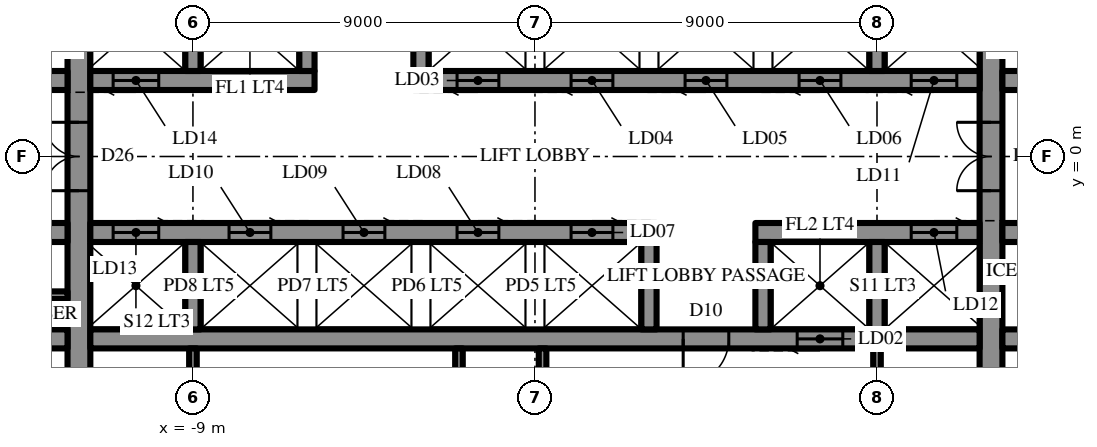
"""IFC4 building model, lengths in metres.
Left out: names, types, materials, properties, quantities, classifications, styles, units other than length and angle.
Written with IfcOpenShell. Run it as: python <this file> out.ifc"""

import sys

from ifc_helpers import new_model, si_unit, direction, frame, frame_2d, origin, place, context, subcontext, project, spatial, rectangle, extrude, element, fill, save


model = new_model("IFC4")
c1 = context("Model", 3, precision=1e-05, world=origin(), true_north=direction((0.0, 1.0)))
c2 = subcontext(c1, "Body", "Model", "MODEL_VIEW")
j1 = project(units=[si_unit("LENGTHUNIT", "METRE"), si_unit("PLANEANGLEUNIT", "RADIAN")], contexts=[c1])
p1 = place(None, origin())
s1 = spatial("IfcSite", under=j1, at=p1, CompositionType="ELEMENT")
p2 = place(p1, origin())
s2 = spatial("IfcBuilding", under=s1, at=p2, CompositionType="ELEMENT")
p3 = place(p2, frame((0.0, 0.0, 306.5)))
s3 = spatial("IfcBuildingStorey", under=s2, at=p3, CompositionType="ELEMENT", Elevation=306.5)
p4 = place(p3, frame((12.0, -10.7, 0.0), z_axis=(0.0, 0.0, 1.0), x_axis=(0.0, 1.0, 0.0)))
e1 = element("IfcWall", 1, at=p4, inside=s3, PredefinedType="SHEAR", context=c2, shape_type="SweptSolid", body=[
    extrude(rectangle(XDim=21.4, YDim=0.6, at=frame_2d((10.7, 0.0))), origin(), (0.0, 0.0, 1.0), 5.0),
])
p5 = place(p4, frame((9.8, 0.0, 0.0)))
e2 = element("IfcOpeningElement", 2, at=p5, cuts=e1, PredefinedType="OPENING", context=c2, shape_type="SweptSolid", body=[
    extrude(rectangle(XDim=1.8, YDim=2.4, at=frame_2d((0.9, 1.2))), frame((0.0, 0.31, 0.0), z_axis=(0.0, -1.0, 0.0), x_axis=(1.0, 0.0, 0.0)), (0.0, 0.0, 1.0), 0.62),
])
p6 = place(p3, frame((-12.0, -10.7, 0.0), z_axis=(0.0, 0.0, 1.0), x_axis=(0.0, 1.0, 0.0)))
e3 = element("IfcWall", 3, at=p6, inside=s3, PredefinedType="SHEAR", context=c2, shape_type="SweptSolid", body=[
    extrude(rectangle(XDim=21.4, YDim=0.6, at=frame_2d((10.7, 0.0))), origin(), (0.0, 0.0, 1.0), 5.0),
])
p7 = place(p6, frame((9.8, 0.0, 0.0)))
e4 = element("IfcOpeningElement", 4, at=p7, cuts=e3, PredefinedType="OPENING", context=c2, shape_type="SweptSolid", body=[
    extrude(rectangle(XDim=1.8, YDim=2.4, at=frame_2d((0.9, 1.2))), frame((0.0, 0.31, 0.0), z_axis=(0.0, -1.0, 0.0), x_axis=(1.0, 0.0, 0.0)), (0.0, 0.0, 1.0), 0.62),
])
p8 = place(p3, frame((-14.5, 2.0, 0.0), z_axis=(0.0, 0.0, 1.0), x_axis=(1.0, 0.0, 0.0)))
e5 = element("IfcWall", 5, at=p8, inside=s3, PredefinedType="SHEAR", context=c2, shape_type="SweptSolid", body=[
    extrude(rectangle(XDim=2.2, YDim=0.5, at=frame_2d((1.1, 0.0))), origin(), (0.0, 0.0, 1.0), 5.0),
])
p9 = place(p8, frame((0.5, 0.0, 0.0)))
e6 = element("IfcOpeningElement", 6, at=p9, cuts=e5, PredefinedType="OPENING", context=c2, shape_type="SweptSolid", body=[
    extrude(rectangle(XDim=0.9, YDim=2.2, at=frame_2d((0.45, 1.1))), frame((0.0, 0.26, 0.0), z_axis=(0.0, -1.0, 0.0), x_axis=(1.0, 0.0, 0.0)), (0.0, 0.0, 1.0), 0.52),
])
p10 = place(p3, frame((-11.7, 2.0, 0.0), z_axis=(0.0, 0.0, 1.0), x_axis=(1.0, 0.0, 0.0)))
e7 = element("IfcWall", 7, at=p10, inside=s3, PredefinedType="SHEAR", context=c2, shape_type="SweptSolid", body=[
    extrude(rectangle(XDim=5.9, YDim=0.5, at=frame_2d((2.95, 0.0))), origin(), (0.0, 0.0, 1.0), 5.0),
])
p11 = place(p10, frame((0.6, 0.0, 0.0)))
e8 = element("IfcOpeningElement", 8, at=p11, cuts=e7, PredefinedType="OPENING", context=c2, shape_type="SweptSolid", body=[
    extrude(rectangle(XDim=1.2, YDim=2.2, at=frame_2d((0.6, 1.1))), frame((0.0, 0.26, 0.0), z_axis=(0.0, -1.0, 0.0), x_axis=(1.0, 0.0, 0.0)), (0.0, 0.0, 1.0), 0.52),
])
p12 = place(p3, frame((-3.2, 2.0, 0.0), z_axis=(0.0, 0.0, 1.0), x_axis=(1.0, 0.0, 0.0)))
e9 = element("IfcWall", 9, at=p12, inside=s3, PredefinedType="SHEAR", context=c2, shape_type="SweptSolid", body=[
    extrude(rectangle(XDim=14.9, YDim=0.5, at=frame_2d((7.45, 0.0))), origin(), (0.0, 0.0, 1.0), 5.0),
])
p13 = place(p12, frame((1.15, 0.0, 0.0)))
e10 = element("IfcOpeningElement", 10, at=p13, cuts=e9, PredefinedType="OPENING", context=c2, shape_type="SweptSolid", body=[
    extrude(rectangle(XDim=1.1, YDim=2.2, at=frame_2d((0.55, 1.1))), frame((0.0, 0.26, 0.0), z_axis=(0.0, -1.0, 0.0), x_axis=(1.0, 0.0, 0.0)), (0.0, 0.0, 1.0), 0.52),
])
p14 = place(p12, frame((4.15, 0.0, 0.0)))
e11 = element("IfcOpeningElement", 11, at=p14, cuts=e9, PredefinedType="OPENING", context=c2, shape_type="SweptSolid", body=[
    extrude(rectangle(XDim=1.1, YDim=2.2, at=frame_2d((0.55, 1.1))), frame((0.0, 0.26, 0.0), z_axis=(0.0, -1.0, 0.0), x_axis=(1.0, 0.0, 0.0)), (0.0, 0.0, 1.0), 0.52),
])
p15 = place(p12, frame((7.15, 0.0, 0.0)))
e12 = element("IfcOpeningElement", 12, at=p15, cuts=e9, PredefinedType="OPENING", context=c2, shape_type="SweptSolid", body=[
    extrude(rectangle(XDim=1.1, YDim=2.2, at=frame_2d((0.55, 1.1))), frame((0.0, 0.26, 0.0), z_axis=(0.0, -1.0, 0.0), x_axis=(1.0, 0.0, 0.0)), (0.0, 0.0, 1.0), 0.52),
])
p16 = place(p12, frame((10.15, 0.0, 0.0)))
e13 = element("IfcOpeningElement", 13, at=p16, cuts=e9, PredefinedType="OPENING", context=c2, shape_type="SweptSolid", body=[
    extrude(rectangle(XDim=1.1, YDim=2.2, at=frame_2d((0.55, 1.1))), frame((0.0, 0.26, 0.0), z_axis=(0.0, -1.0, 0.0), x_axis=(1.0, 0.0, 0.0)), (0.0, 0.0, 1.0), 0.52),
])
p17 = place(p12, frame((13.1, 0.0, 0.0)))
e14 = element("IfcOpeningElement", 14, at=p17, cuts=e9, PredefinedType="OPENING", context=c2, shape_type="SweptSolid", body=[
    extrude(rectangle(XDim=1.2, YDim=2.2, at=frame_2d((0.6, 1.1))), frame((0.0, 0.26, 0.0), z_axis=(0.0, -1.0, 0.0), x_axis=(1.0, 0.0, 0.0)), (0.0, 0.0, 1.0), 0.52),
])
p18 = place(p3, frame((12.3, 2.0, 0.0), z_axis=(0.0, 0.0, 1.0), x_axis=(1.0, 0.0, 0.0)))
e15 = element("IfcWall", 15, at=p18, inside=s3, PredefinedType="SHEAR", context=c2, shape_type="SweptSolid", body=[
    extrude(rectangle(XDim=2.2, YDim=0.5, at=frame_2d((1.1, 0.0))), origin(), (0.0, 0.0, 1.0), 5.0),
])
p19 = place(p18, frame((0.8, 0.0, 0.0)))
e16 = element("IfcOpeningElement", 16, at=p19, cuts=e15, PredefinedType="OPENING", context=c2, shape_type="SweptSolid", body=[
    extrude(rectangle(XDim=0.9, YDim=2.2, at=frame_2d((0.45, 1.1))), frame((0.0, 0.26, 0.0), z_axis=(0.0, -1.0, 0.0), x_axis=(1.0, 0.0, 0.0)), (0.0, 0.0, 1.0), 0.52),
])
for number, where, z_axis, x_axis in (
    (17, (-9.0, 2.25, 0.0), (0.0, 0.0, 1.0), (0.0, 1.0, 0.0)),
    (18, (-6.0, 2.25, 0.0), (0.0, 0.0, 1.0), (0.0, 1.0, 0.0)),
    (19, (-3.0, 2.25, 0.0), (0.0, 0.0, 1.0), (0.0, 1.0, 0.0)),
    (20, (9.0, 2.25, 0.0), (0.0, 0.0, 1.0), (0.0, 1.0, 0.0)),
):
    element("IfcWall", number, at=place(p3, frame(where, z_axis=z_axis, x_axis=x_axis)), inside=s3, PredefinedType="SHEAR", context=c2, shape_type="SweptSolid", body=[
        extrude(rectangle(XDim=2.3, YDim=0.4, at=frame_2d((1.15, 0.0))), origin(), (0.0, 0.0, 1.0), 5.0),
    ])
p20 = place(p3, frame((14.5, -2.0, 0.0), z_axis=(0.0, 0.0, 1.0), x_axis=(-1.0, 0.0, 0.0)))
e21 = element("IfcWall", 21, at=p20, inside=s3, PredefinedType="SHEAR", context=c2, shape_type="SweptSolid", body=[
    extrude(rectangle(XDim=2.2, YDim=0.5, at=frame_2d((1.1, 0.0))), origin(), (0.0, 0.0, 1.0), 5.0),
])
p21 = place(p20, frame((0.5, 0.0, 0.0)))
e22 = element("IfcOpeningElement", 22, at=p21, cuts=e21, PredefinedType="OPENING", context=c2, shape_type="SweptSolid", body=[
    extrude(rectangle(XDim=0.9, YDim=2.2, at=frame_2d((0.45, 1.1))), frame((0.0, 0.26, 0.0), z_axis=(0.0, -1.0, 0.0), x_axis=(1.0, 0.0, 0.0)), (0.0, 0.0, 1.0), 0.52),
])
p22 = place(p3, frame((11.7, -2.0, 0.0), z_axis=(0.0, 0.0, 1.0), x_axis=(-1.0, 0.0, 0.0)))
e23 = element("IfcWall", 23, at=p22, inside=s3, PredefinedType="SHEAR", context=c2, shape_type="SweptSolid", body=[
    extrude(rectangle(XDim=5.9, YDim=0.5, at=frame_2d((2.95, 0.0))), origin(), (0.0, 0.0, 1.0), 5.0),
])
p23 = place(p22, frame((0.6, 0.0, 0.0)))
e24 = element("IfcOpeningElement", 24, at=p23, cuts=e23, PredefinedType="OPENING", context=c2, shape_type="SweptSolid", body=[
    extrude(rectangle(XDim=1.2, YDim=2.2, at=frame_2d((0.6, 1.1))), frame((0.0, 0.26, 0.0), z_axis=(0.0, -1.0, 0.0), x_axis=(1.0, 0.0, 0.0)), (0.0, 0.0, 1.0), 0.52),
])
p24 = place(p3, frame((3.2, -2.0, 0.0), z_axis=(0.0, 0.0, 1.0), x_axis=(-1.0, 0.0, 0.0)))
e25 = element("IfcWall", 25, at=p24, inside=s3, PredefinedType="SHEAR", context=c2, shape_type="SweptSolid", body=[
    extrude(rectangle(XDim=14.9, YDim=0.5, at=frame_2d((7.45, 0.0))), origin(), (0.0, 0.0, 1.0), 5.0),
])
p25 = place(p24, frame((1.15, 0.0, 0.0)))
e26 = element("IfcOpeningElement", 26, at=p25, cuts=e25, PredefinedType="OPENING", context=c2, shape_type="SweptSolid", body=[
    extrude(rectangle(XDim=1.1, YDim=2.2, at=frame_2d((0.55, 1.1))), frame((0.0, 0.26, 0.0), z_axis=(0.0, -1.0, 0.0), x_axis=(1.0, 0.0, 0.0)), (0.0, 0.0, 1.0), 0.52),
])
p26 = place(p24, frame((4.15, 0.0, 0.0)))
e27 = element("IfcOpeningElement", 27, at=p26, cuts=e25, PredefinedType="OPENING", context=c2, shape_type="SweptSolid", body=[
    extrude(rectangle(XDim=1.1, YDim=2.2, at=frame_2d((0.55, 1.1))), frame((0.0, 0.26, 0.0), z_axis=(0.0, -1.0, 0.0), x_axis=(1.0, 0.0, 0.0)), (0.0, 0.0, 1.0), 0.52),
])
p27 = place(p24, frame((7.15, 0.0, 0.0)))
e28 = element("IfcOpeningElement", 28, at=p27, cuts=e25, PredefinedType="OPENING", context=c2, shape_type="SweptSolid", body=[
    extrude(rectangle(XDim=1.1, YDim=2.2, at=frame_2d((0.55, 1.1))), frame((0.0, 0.26, 0.0), z_axis=(0.0, -1.0, 0.0), x_axis=(1.0, 0.0, 0.0)), (0.0, 0.0, 1.0), 0.52),
])
p28 = place(p24, frame((10.15, 0.0, 0.0)))
e29 = element("IfcOpeningElement", 29, at=p28, cuts=e25, PredefinedType="OPENING", context=c2, shape_type="SweptSolid", body=[
    extrude(rectangle(XDim=1.1, YDim=2.2, at=frame_2d((0.55, 1.1))), frame((0.0, 0.26, 0.0), z_axis=(0.0, -1.0, 0.0), x_axis=(1.0, 0.0, 0.0)), (0.0, 0.0, 1.0), 0.52),
])
p29 = place(p24, frame((13.1, 0.0, 0.0)))
e30 = element("IfcOpeningElement", 30, at=p29, cuts=e25, PredefinedType="OPENING", context=c2, shape_type="SweptSolid", body=[
    extrude(rectangle(XDim=1.2, YDim=2.2, at=frame_2d((0.6, 1.1))), frame((0.0, 0.26, 0.0), z_axis=(0.0, -1.0, 0.0), x_axis=(1.0, 0.0, 0.0)), (0.0, 0.0, 1.0), 0.52),
])
p30 = place(p3, frame((-12.3, -2.0, 0.0), z_axis=(0.0, 0.0, 1.0), x_axis=(-1.0, 0.0, 0.0)))
e31 = element("IfcWall", 31, at=p30, inside=s3, PredefinedType="SHEAR", context=c2, shape_type="SweptSolid", body=[
    extrude(rectangle(XDim=2.2, YDim=0.5, at=frame_2d((1.1, 0.0))), origin(), (0.0, 0.0, 1.0), 5.0),
])
p31 = place(p30, frame((0.8, 0.0, 0.0)))
e32 = element("IfcOpeningElement", 32, at=p31, cuts=e31, PredefinedType="OPENING", context=c2, shape_type="SweptSolid", body=[
    extrude(rectangle(XDim=0.9, YDim=2.2, at=frame_2d((0.45, 1.1))), frame((0.0, 0.26, 0.0), z_axis=(0.0, -1.0, 0.0), x_axis=(1.0, 0.0, 0.0)), (0.0, 0.0, 1.0), 0.52),
])
p32 = place(p3, frame((14.5, -4.8, 0.0), z_axis=(0.0, 0.0, 1.0), x_axis=(-1.0, 0.0, 0.0)))
e33 = element("IfcWall", 33, at=p32, inside=s3, PredefinedType="SHEAR", context=c2, shape_type="SweptSolid", body=[
    extrude(rectangle(XDim=2.2, YDim=0.5, at=frame_2d((1.1, 0.0))), origin(), (0.0, 0.0, 1.0), 5.0),
])
p33 = place(p3, frame((11.7, -4.8, 0.0), z_axis=(0.0, 0.0, 1.0), x_axis=(-1.0, 0.0, 0.0)))
e34 = element("IfcWall", 34, at=p33, inside=s3, PredefinedType="SHEAR", context=c2, shape_type="SweptSolid", body=[
    extrude(rectangle(XDim=23.4, YDim=0.5, at=frame_2d((11.7, 0.0))), origin(), (0.0, 0.0, 1.0), 5.0),
])
p34 = place(p33, frame((6.6, 0.0, 0.0)))
e35 = element("IfcOpeningElement", 35, at=p34, cuts=e34, PredefinedType="OPENING", context=c2, shape_type="SweptSolid", body=[
    extrude(rectangle(XDim=1.2, YDim=2.2, at=frame_2d((0.6, 1.1))), frame((0.0, 0.26, 0.0), z_axis=(0.0, -1.0, 0.0), x_axis=(1.0, 0.0, 0.0)), (0.0, 0.0, 1.0), 0.52),
])
p35 = place(p33, frame((3.6, 0.0, 0.0)))
e36 = element("IfcOpeningElement", 36, at=p35, cuts=e34, PredefinedType="OPENING", context=c2, shape_type="SweptSolid", body=[
    extrude(rectangle(XDim=1.2, YDim=2.2, at=frame_2d((0.6, 1.1))), frame((0.0, 0.26, 0.0), z_axis=(0.0, -1.0, 0.0), x_axis=(1.0, 0.0, 0.0)), (0.0, 0.0, 1.0), 0.52),
])
p36 = place(p3, frame((-12.3, -4.8, 0.0), z_axis=(0.0, 0.0, 1.0), x_axis=(-1.0, 0.0, 0.0)))
e37 = element("IfcWall", 37, at=p36, inside=s3, PredefinedType="SHEAR", context=c2, shape_type="SweptSolid", body=[
    extrude(rectangle(XDim=2.2, YDim=0.5, at=frame_2d((1.1, 0.0))), origin(), (0.0, 0.0, 1.0), 5.0),
])
for number, where, z_axis, x_axis in (
    (38, (9.0, -2.25, 0.0), (0.0, 0.0, 1.0), (0.0, -1.0, 0.0)),
    (39, (6.0, -2.25, 0.0), (0.0, 0.0, 1.0), (0.0, -1.0, 0.0)),
    (40, (3.0, -2.25, 0.0), (0.0, 0.0, 1.0), (0.0, -1.0, 0.0)),
    (41, (-9.0, -2.25, 0.0), (0.0, 0.0, 1.0), (0.0, -1.0, 0.0)),
):
    element("IfcWall", number, at=place(p3, frame(where, z_axis=z_axis, x_axis=x_axis)), inside=s3, PredefinedType="SHEAR", context=c2, shape_type="SweptSolid", body=[
        extrude(rectangle(XDim=2.3, YDim=0.4, at=frame_2d((1.15, 0.0))), origin(), (0.0, 0.0, 1.0), 5.0),
    ])
p37 = place(p3, frame((0.2, -5.05, 0.0), z_axis=(0.0, 0.0, 1.0), x_axis=(0.0, -1.0, 0.0)))
e42 = element("IfcWall", 42, at=p37, inside=s3, PredefinedType="SHEAR", context=c2, shape_type="SweptSolid", body=[
    extrude(rectangle(XDim=5.65, YDim=0.2, at=frame_2d((2.825, 0.0))), origin(), (0.0, 0.0, 1.0), 5.0),
])
for number, where, z_axis, x_axis in (
    (43, (9.0, -5.05, 0.0), (0.0, 0.0, 1.0), (0.0, -1.0, 0.0)),
    (44, (-9.0, -5.05, 0.0), (0.0, 0.0, 1.0), (0.0, -1.0, 0.0)),
    (45, (-2.0, -5.05, 0.0), (0.0, 0.0, 1.0), (0.0, -1.0, 0.0)),
):
    element("IfcWall", number, at=place(p3, frame(where, z_axis=z_axis, x_axis=x_axis)), inside=s3, PredefinedType="PARTITIONING", context=c2, shape_type="SweptSolid", body=[
        extrude(rectangle(XDim=5.65, YDim=0.2, at=frame_2d((2.825, 0.0))), origin(), (0.0, 0.0, 1.0), 4.8),
    ])
p38 = place(p3, frame((-12.3, -3.65, 0.0), z_axis=(0.0, 0.0, 1.0), x_axis=(-1.0, 0.0, 0.0)))
e46 = element("IfcWall", 46, at=p38, inside=s3, PredefinedType="PARTITIONING", context=c2, shape_type="SweptSolid", body=[
    extrude(rectangle(XDim=1.0, YDim=0.2, at=frame_2d((0.5, 0.0))), origin(), (0.0, 0.0, 1.0), 4.8),
])
p39 = place(p34, origin())
e47 = element("IfcDoor", 47, at=p39, inside=s3, OperationType="SINGLE_SWING_LEFT", PredefinedType="DOOR", context=c2, shape_type="SweptSolid", body=[
    extrude(rectangle(XDim=1.2, YDim=2.2, at=frame_2d((0.6, 1.1))), frame((0.0, 0.025, 0.0), z_axis=(0.0, -1.0, 0.0), x_axis=(1.0, 0.0, 0.0)), (0.0, 0.0, 1.0), 0.05),
])
fill(e35, e47)
p40 = place(p5, origin())
e48 = element("IfcDoor", 48, at=p40, inside=s3, OperationType="DOUBLE_DOOR_SINGLE_SWING", PredefinedType="DOOR", context=c2, shape_type="SweptSolid", body=[
    extrude(rectangle(XDim=1.8, YDim=2.4, at=frame_2d((0.9, 1.2))), frame((0.0, 0.025, 0.0), z_axis=(0.0, -1.0, 0.0), x_axis=(1.0, 0.0, 0.0)), (0.0, 0.0, 1.0), 0.05),
])
fill(e2, e48)
p41 = place(p7, origin())
e49 = element("IfcDoor", 49, at=p41, inside=s3, OperationType="DOUBLE_DOOR_SINGLE_SWING", PredefinedType="DOOR", context=c2, shape_type="SweptSolid", body=[
    extrude(rectangle(XDim=1.8, YDim=2.4, at=frame_2d((0.9, 1.2))), frame((0.0, 0.025, 0.0), z_axis=(0.0, -1.0, 0.0), x_axis=(1.0, 0.0, 0.0)), (0.0, 0.0, 1.0), 0.05),
])
fill(e4, e49)
p42 = place(p11, frame((1.2, 0.0, 0.0), z_axis=(0.0, 0.0, 1.0), x_axis=(-1.0, 0.0, 0.0)))
e50 = element("IfcDoor", 50, at=p42, inside=s3, OperationType="SLIDING_TO_LEFT", PredefinedType="DOOR", context=c2, shape_type="SweptSolid", body=[
    extrude(rectangle(XDim=1.2, YDim=2.2, at=frame_2d((0.6, 1.1))), frame((0.0, 0.025, 0.0), z_axis=(0.0, -1.0, 0.0), x_axis=(1.0, 0.0, 0.0)), (0.0, 0.0, 1.0), 0.05),
])
fill(e8, e50)
p43 = place(p13, frame((1.1, 0.0, 0.0), z_axis=(0.0, 0.0, 1.0), x_axis=(-1.0, 0.0, 0.0)))
e51 = element("IfcDoor", 51, at=p43, inside=s3, OperationType="SLIDING_TO_LEFT", PredefinedType="DOOR", context=c2, shape_type="SweptSolid", body=[
    extrude(rectangle(XDim=1.1, YDim=2.2, at=frame_2d((0.55, 1.1))), frame((0.0, 0.025, 0.0), z_axis=(0.0, -1.0, 0.0), x_axis=(1.0, 0.0, 0.0)), (0.0, 0.0, 1.0), 0.05),
])
fill(e10, e51)
p44 = place(p14, frame((1.1, 0.0, 0.0), z_axis=(0.0, 0.0, 1.0), x_axis=(-1.0, 0.0, 0.0)))
e52 = element("IfcDoor", 52, at=p44, inside=s3, OperationType="SLIDING_TO_LEFT", PredefinedType="DOOR", context=c2, shape_type="SweptSolid", body=[
    extrude(rectangle(XDim=1.1, YDim=2.2, at=frame_2d((0.55, 1.1))), frame((0.0, 0.025, 0.0), z_axis=(0.0, -1.0, 0.0), x_axis=(1.0, 0.0, 0.0)), (0.0, 0.0, 1.0), 0.05),
])
fill(e11, e52)
p45 = place(p15, frame((1.1, 0.0, 0.0), z_axis=(0.0, 0.0, 1.0), x_axis=(-1.0, 0.0, 0.0)))
e53 = element("IfcDoor", 53, at=p45, inside=s3, OperationType="SLIDING_TO_LEFT", PredefinedType="DOOR", context=c2, shape_type="SweptSolid", body=[
    extrude(rectangle(XDim=1.1, YDim=2.2, at=frame_2d((0.55, 1.1))), frame((0.0, 0.025, 0.0), z_axis=(0.0, -1.0, 0.0), x_axis=(1.0, 0.0, 0.0)), (0.0, 0.0, 1.0), 0.05),
])
fill(e12, e53)
p46 = place(p16, frame((1.1, 0.0, 0.0), z_axis=(0.0, 0.0, 1.0), x_axis=(-1.0, 0.0, 0.0)))
e54 = element("IfcDoor", 54, at=p46, inside=s3, OperationType="SLIDING_TO_LEFT", PredefinedType="DOOR", context=c2, shape_type="SweptSolid", body=[
    extrude(rectangle(XDim=1.1, YDim=2.2, at=frame_2d((0.55, 1.1))), frame((0.0, 0.025, 0.0), z_axis=(0.0, -1.0, 0.0), x_axis=(1.0, 0.0, 0.0)), (0.0, 0.0, 1.0), 0.05),
])
fill(e13, e54)
p47 = place(p17, frame((1.2, 0.0, 0.0), z_axis=(0.0, 0.0, 1.0), x_axis=(-1.0, 0.0, 0.0)))
e55 = element("IfcDoor", 55, at=p47, inside=s3, OperationType="SLIDING_TO_LEFT", PredefinedType="DOOR", context=c2, shape_type="SweptSolid", body=[
    extrude(rectangle(XDim=1.2, YDim=2.2, at=frame_2d((0.6, 1.1))), frame((0.0, 0.025, 0.0), z_axis=(0.0, -1.0, 0.0), x_axis=(1.0, 0.0, 0.0)), (0.0, 0.0, 1.0), 0.05),
])
fill(e14, e55)
p48 = place(p23, frame((1.2, 0.0, 0.0), z_axis=(0.0, 0.0, 1.0), x_axis=(-1.0, 0.0, 0.0)))
e56 = element("IfcDoor", 56, at=p48, inside=s3, OperationType="SLIDING_TO_LEFT", PredefinedType="DOOR", context=c2, shape_type="SweptSolid", body=[
    extrude(rectangle(XDim=1.2, YDim=2.2, at=frame_2d((0.6, 1.1))), frame((0.0, 0.025, 0.0), z_axis=(0.0, -1.0, 0.0), x_axis=(1.0, 0.0, 0.0)), (0.0, 0.0, 1.0), 0.05),
])
fill(e24, e56)
p49 = place(p35, origin())
e57 = element("IfcDoor", 57, at=p49, inside=s3, OperationType="SLIDING_TO_LEFT", PredefinedType="DOOR", context=c2, shape_type="SweptSolid", body=[
    extrude(rectangle(XDim=1.2, YDim=2.2, at=frame_2d((0.6, 1.1))), frame((0.0, 0.025, 0.0), z_axis=(0.0, -1.0, 0.0), x_axis=(1.0, 0.0, 0.0)), (0.0, 0.0, 1.0), 0.05),
])
fill(e36, e57)
p50 = place(p25, frame((1.1, 0.0, 0.0), z_axis=(0.0, 0.0, 1.0), x_axis=(-1.0, 0.0, 0.0)))
e58 = element("IfcDoor", 58, at=p50, inside=s3, OperationType="SLIDING_TO_LEFT", PredefinedType="DOOR", context=c2, shape_type="SweptSolid", body=[
    extrude(rectangle(XDim=1.1, YDim=2.2, at=frame_2d((0.55, 1.1))), frame((0.0, 0.025, 0.0), z_axis=(0.0, -1.0, 0.0), x_axis=(1.0, 0.0, 0.0)), (0.0, 0.0, 1.0), 0.05),
])
fill(e26, e58)
p51 = place(p26, frame((1.1, 0.0, 0.0), z_axis=(0.0, 0.0, 1.0), x_axis=(-1.0, 0.0, 0.0)))
e59 = element("IfcDoor", 59, at=p51, inside=s3, OperationType="SLIDING_TO_LEFT", PredefinedType="DOOR", context=c2, shape_type="SweptSolid", body=[
    extrude(rectangle(XDim=1.1, YDim=2.2, at=frame_2d((0.55, 1.1))), frame((0.0, 0.025, 0.0), z_axis=(0.0, -1.0, 0.0), x_axis=(1.0, 0.0, 0.0)), (0.0, 0.0, 1.0), 0.05),
])
fill(e27, e59)
p52 = place(p27, frame((1.1, 0.0, 0.0), z_axis=(0.0, 0.0, 1.0), x_axis=(-1.0, 0.0, 0.0)))
e60 = element("IfcDoor", 60, at=p52, inside=s3, OperationType="SLIDING_TO_LEFT", PredefinedType="DOOR", context=c2, shape_type="SweptSolid", body=[
    extrude(rectangle(XDim=1.1, YDim=2.2, at=frame_2d((0.55, 1.1))), frame((0.0, 0.025, 0.0), z_axis=(0.0, -1.0, 0.0), x_axis=(1.0, 0.0, 0.0)), (0.0, 0.0, 1.0), 0.05),
])
fill(e28, e60)
p53 = place(p28, frame((1.1, 0.0, 0.0), z_axis=(0.0, 0.0, 1.0), x_axis=(-1.0, 0.0, 0.0)))
e61 = element("IfcDoor", 61, at=p53, inside=s3, OperationType="SLIDING_TO_LEFT", PredefinedType="DOOR", context=c2, shape_type="SweptSolid", body=[
    extrude(rectangle(XDim=1.1, YDim=2.2, at=frame_2d((0.55, 1.1))), frame((0.0, 0.025, 0.0), z_axis=(0.0, -1.0, 0.0), x_axis=(1.0, 0.0, 0.0)), (0.0, 0.0, 1.0), 0.05),
])
fill(e29, e61)
p54 = place(p29, frame((1.2, 0.0, 0.0), z_axis=(0.0, 0.0, 1.0), x_axis=(-1.0, 0.0, 0.0)))
e62 = element("IfcDoor", 62, at=p54, inside=s3, OperationType="SLIDING_TO_LEFT", PredefinedType="DOOR", context=c2, shape_type="SweptSolid", body=[
    extrude(rectangle(XDim=1.2, YDim=2.2, at=frame_2d((0.6, 1.1))), frame((0.0, 0.025, 0.0), z_axis=(0.0, -1.0, 0.0), x_axis=(1.0, 0.0, 0.0)), (0.0, 0.0, 1.0), 0.05),
])
fill(e30, e62)
save(model, sys.argv[1])
